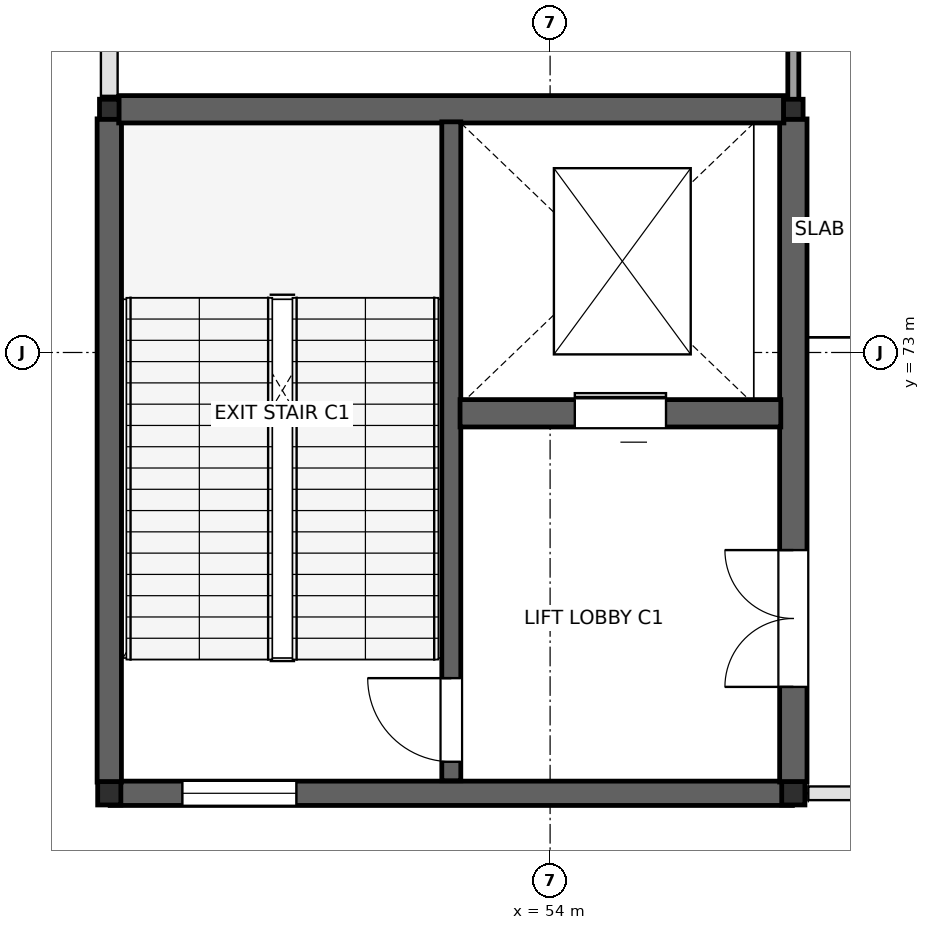
"""IFC4 building model, lengths in metres.
Left out: names, types, materials, properties, quantities, classifications, styles, units other than length and angle.
Written with IfcOpenShell. Run it as: python <this file> out.ifc"""

import sys

from ifc_helpers import new_model, si_unit, direction, frame, frame_2d, origin, origin_2d, place, context, subcontext, project, spatial, rectangle, i_section, extrude, element, fill, save


model = new_model("IFC4")
c1 = context("Model", 3, precision=1e-05, world=origin(), true_north=direction((0.0, 1.0)))
c2 = subcontext(c1, "Body", "Model", "MODEL_VIEW")
j1 = project(units=[si_unit("LENGTHUNIT", "METRE"), si_unit("PLANEANGLEUNIT", "RADIAN")], contexts=[c1])
p1 = place(None, origin())
s1 = spatial("IfcSite", under=j1, at=p1, CompositionType="ELEMENT")
p2 = place(p1, origin())
s2 = spatial("IfcBuilding", under=s1, at=p2, CompositionType="ELEMENT")
p3 = place(p2, frame((0.0, 0.0, 6.0)))
s3 = spatial("IfcBuildingStorey", under=s2, at=p3, CompositionType="ELEMENT", Elevation=6.0)
for number, where, z_axis, x_axis in (
    (1, (48.2, 67.2, 0.0), (0.0, 0.0, 1.0), (1.0, 0.0, 0.0)),
    (2, (57.2, 67.2, 0.0), (0.0, 0.0, 1.0), (1.0, 0.0, 0.0)),
):
    element("IfcColumn", number, at=place(p3, frame(where, z_axis=z_axis, x_axis=x_axis)), inside=s3, PredefinedType="COLUMN", context=c2, shape_type="SweptSolid", body=[
        extrude(i_section(OverallWidth=0.305, OverallDepth=0.307, WebThickness=0.01, FlangeThickness=0.015, at=origin_2d()), origin(), (0.0, 0.0, 1.0), 6.0),
    ])
for number, where, z_axis, x_axis in (
    (3, (48.2, 76.2, 0.0), (0.0, 0.0, 1.0), (1.0, 0.0, 0.0)),
    (4, (57.2, 76.2, 0.0), (0.0, 0.0, 1.0), (1.0, 0.0, 0.0)),
):
    element("IfcColumn", number, at=place(p3, frame(where, z_axis=z_axis, x_axis=x_axis)), inside=s3, PredefinedType="COLUMN", context=c2, shape_type="SweptSolid", body=[
        extrude(i_section(OverallWidth=0.257, OverallDepth=0.264, WebThickness=0.012, FlangeThickness=0.02, at=origin_2d()), origin(), (0.0, 0.0, 1.0), 6.0),
    ])
p4 = place(p3, frame((57.188, 67.2, 0.0), z_axis=(0.0, 0.0, 1.0), x_axis=(-1.0, 0.0, 0.0)))
e5 = element("IfcWall", 5, at=p4, inside=s3, PredefinedType="STANDARD", context=c2, shape_type="SweptSolid", body=[
    extrude(rectangle(XDim=8.976, YDim=0.32, at=frame_2d((4.488, 0.0))), origin(), (0.0, 0.0, 1.0), 5.78),
])
p5 = place(p4, frame((6.526, 0.0, 1.2)))
e6 = element("IfcOpeningElement", 6, at=p5, cuts=e5, PredefinedType="OPENING", context=c2, shape_type="SweptSolid", body=[
    extrude(rectangle(XDim=1.5, YDim=1.8, at=frame_2d((0.75, 0.9))), frame((0.0, 0.17, 0.0), z_axis=(0.0, -1.0, 0.0), x_axis=(1.0, 0.0, 0.0)), (0.0, 0.0, 1.0), 0.34),
])
p6 = place(p3, frame((48.2, 67.347, 0.0), z_axis=(0.0, 0.0, 1.0), x_axis=(0.0, 1.0, 0.0)))
e7 = element("IfcWall", 7, at=p6, inside=s3, PredefinedType="STANDARD", context=c2, shape_type="SweptSolid", body=[
    extrude(rectangle(XDim=8.727, YDim=0.32, at=frame_2d((4.364, 0.0))), origin(), (0.0, 0.0, 1.0), 5.78),
])
p7 = place(p3, frame((57.2, 67.348, 0.0), z_axis=(0.0, 0.0, 1.0), x_axis=(0.0, 1.0, 0.0)))
e8 = element("IfcWall", 8, at=p7, inside=s3, PredefinedType="SHEAR", context=c2, shape_type="SweptSolid", body=[
    extrude(rectangle(XDim=8.725, YDim=0.36, at=frame_2d((4.363, 0.0))), origin(), (0.0, 0.0, 1.0), 5.78),
])
p8 = place(p7, frame((1.252, 0.0, 0.0)))
e9 = element("IfcOpeningElement", 9, at=p8, cuts=e8, PredefinedType="OPENING", context=c2, shape_type="SweptSolid", body=[
    extrude(rectangle(XDim=1.8, YDim=2.3, at=frame_2d((0.9, 1.15))), frame((0.0, 0.19, 0.0), z_axis=(0.0, -1.0, 0.0), x_axis=(1.0, 0.0, 0.0)), (0.0, 0.0, 1.0), 0.38),
])
p9 = place(p3, frame((48.324, 76.2, 0.0), z_axis=(0.0, 0.0, 1.0), x_axis=(1.0, 0.0, 0.0)))
e10 = element("IfcWall", 10, at=p9, inside=s3, PredefinedType="SHEAR", context=c2, shape_type="SweptSolid", body=[
    extrude(rectangle(XDim=8.752, YDim=0.36, at=frame_2d((4.376, 0.0))), origin(), (0.0, 0.0, 1.0), 5.78),
])
p10 = place(p3, frame((52.7, 67.365, 0.0), z_axis=(0.0, 0.0, 1.0), x_axis=(0.0, 1.0, 0.0)))
e11 = element("IfcWall", 11, at=p10, inside=s3, PredefinedType="SHEAR", context=c2, shape_type="SweptSolid", body=[
    extrude(rectangle(XDim=8.67, YDim=0.25, at=frame_2d((4.335, 0.0))), origin(), (0.0, 0.0, 1.0), 5.78),
])
p11 = place(p10, frame((0.25, 0.0, 0.0)))
e12 = element("IfcOpeningElement", 12, at=p11, cuts=e11, PredefinedType="OPENING", context=c2, shape_type="SweptSolid", body=[
    extrude(rectangle(XDim=1.1, YDim=2.2, at=frame_2d((0.55, 1.1))), frame((0.0, 0.135, 0.0), z_axis=(0.0, -1.0, 0.0), x_axis=(1.0, 0.0, 0.0)), (0.0, 0.0, 1.0), 0.27),
])
p12 = place(p3, frame((52.815, 72.2, 0.0), z_axis=(0.0, 0.0, 1.0), x_axis=(1.0, 0.0, 0.0)))
e13 = element("IfcWall", 13, at=p12, inside=s3, PredefinedType="SHEAR", context=c2, shape_type="SweptSolid", body=[
    extrude(rectangle(XDim=4.22, YDim=0.36, at=frame_2d((2.11, 0.0))), origin(), (0.0, 0.0, 1.0), 5.78),
])
p13 = place(p12, frame((1.51, 0.0, 0.0)))
e14 = element("IfcOpeningElement", 14, at=p13, cuts=e13, PredefinedType="OPENING", context=c2, shape_type="SweptSolid", body=[
    extrude(rectangle(XDim=1.2, YDim=2.3, at=frame_2d((0.6, 1.15))), frame((0.0, 0.19, 0.0), z_axis=(0.0, -1.0, 0.0), x_axis=(1.0, 0.0, 0.0)), (0.0, 0.0, 1.0), 0.38),
])
p14 = place(p3, frame((57.2, 76.327, 0.0), z_axis=(0.0, 0.0, 1.0), x_axis=(0.0, 1.0, 0.0)))
e15 = element("IfcWall", 15, at=p14, inside=s3, PredefinedType="PARTITIONING", context=c2, shape_type="SweptSolid", body=[
    extrude(rectangle(XDim=8.546, YDim=0.145, at=frame_2d((4.273, 0.0))), origin(), (0.0, 0.0, 1.0), 4.55),
])
p15 = place(p5, origin())
e16 = element("IfcWindow", 16, at=p15, inside=s3, PartitioningType="SINGLE_PANEL", PredefinedType="WINDOW", context=c2, shape_type="SweptSolid", body=[
    extrude(rectangle(XDim=1.5, YDim=1.8, at=frame_2d((0.75, 0.9))), frame((0.0, 0.03, 0.0), z_axis=(0.0, -1.0, 0.0), x_axis=(1.0, 0.0, 0.0)), (0.0, 0.0, 1.0), 0.06),
])
fill(e6, e16)
p16 = place(p11, origin())
e17 = element("IfcDoor", 17, at=p16, inside=s3, OperationType="SINGLE_SWING_RIGHT", PredefinedType="DOOR", context=c2, shape_type="SweptSolid", body=[
    extrude(rectangle(XDim=1.1, YDim=2.2, at=frame_2d((0.55, 1.1))), frame((0.0, 0.025, 0.0), z_axis=(0.0, -1.0, 0.0), x_axis=(1.0, 0.0, 0.0)), (0.0, 0.0, 1.0), 0.05),
])
fill(e12, e17)
p17 = place(p13, origin())
e18 = element("IfcDoor", 18, at=p17, inside=s3, OperationType="SLIDING_TO_RIGHT", PredefinedType="DOOR", context=c2, shape_type="SweptSolid", body=[
    extrude(rectangle(XDim=1.2, YDim=2.3, at=frame_2d((0.6, 1.15))), frame((0.0, 0.025, 0.0), z_axis=(0.0, -1.0, 0.0), x_axis=(1.0, 0.0, 0.0)), (0.0, 0.0, 1.0), 0.05),
])
fill(e14, e18)
p18 = place(p8, origin())
e19 = element("IfcDoor", 19, at=p18, inside=s3, OperationType="DOUBLE_DOOR_SINGLE_SWING", PredefinedType="DOOR", context=c2, shape_type="SweptSolid", body=[
    extrude(rectangle(XDim=1.8, YDim=2.3, at=frame_2d((0.9, 1.15))), frame((0.0, 0.025, 0.0), z_axis=(0.0, -1.0, 0.0), x_axis=(1.0, 0.0, 0.0)), (0.0, 0.0, 1.0), 0.05),
])
fill(e9, e19)
save(model, sys.argv[1])
